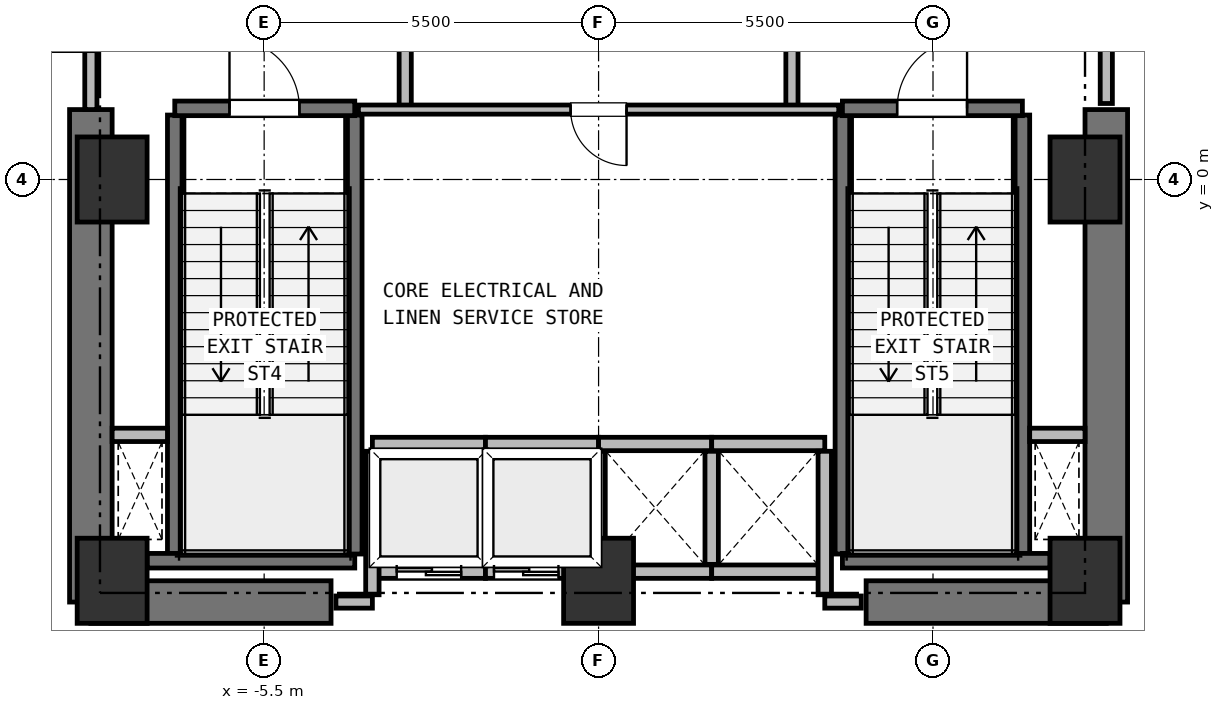
"""IFC4 building model, lengths in metres.
Left out: names, types, materials, properties, quantities, classifications, styles, units other than length and angle.
Written with IfcOpenShell. Run it as: python <this file> out.ifc"""

import sys

from ifc_helpers import new_model, si_unit, direction, frame, frame_2d, origin, origin_2d, place, context, subcontext, project, spatial, rectangle, extrude, element, fill, save


model = new_model("IFC4")
c1 = context("Model", 3, precision=1e-05, world=origin(), true_north=direction((0.0, 1.0)))
c2 = subcontext(c1, "Body", "Model", "MODEL_VIEW")
j1 = project(units=[si_unit("LENGTHUNIT", "METRE"), si_unit("PLANEANGLEUNIT", "RADIAN")], contexts=[c1])
p1 = place(None, origin())
s1 = spatial("IfcSite", under=j1, at=p1, CompositionType="ELEMENT")
p2 = place(p1, origin())
s2 = spatial("IfcBuilding", under=s1, at=p2, CompositionType="ELEMENT")
p3 = place(p2, frame((0.0, 0.0, 6.0)))
s3 = spatial("IfcBuildingStorey", under=s2, at=p3, CompositionType="ELEMENT", Elevation=6.0)
for number, where, z_axis, x_axis in (
    (1, (-8.0, -6.6, 0.0), (0.0, 0.0, 1.0), (1.0, 0.0, 0.0)),
    (2, (0.0, -6.6, 0.0), (0.0, 0.0, 1.0), (1.0, 0.0, 0.0)),
    (3, (8.0, -6.6, 0.0), (0.0, 0.0, 1.0), (1.0, 0.0, 0.0)),
    (4, (8.0, 0.0, 0.0), (0.0, 0.0, 1.0), (1.0, 0.0, 0.0)),
    (5, (-8.0, 0.0, 0.0), (0.0, 0.0, 1.0), (1.0, 0.0, 0.0)),
):
    element("IfcColumn", number, at=place(p3, frame(where, z_axis=z_axis, x_axis=x_axis)), inside=s3, PredefinedType="COLUMN", context=c2, shape_type="SweptSolid", body=[
        extrude(rectangle(XDim=1.15, YDim=1.4, at=origin_2d()), origin(), (0.0, 0.0, 1.0), 5.0),
    ])
for number, where, z_axis, x_axis in (
    (6, (-8.35, -6.95, 0.0), (0.0, 0.0, 1.0), (1.0, 0.0, 0.0)),
    (7, (4.4, -6.95, 0.0), (0.0, 0.0, 1.0), (1.0, 0.0, 0.0)),
):
    element("IfcWall", number, at=place(p3, frame(where, z_axis=z_axis, x_axis=x_axis)), inside=s3, PredefinedType="SHEAR", context=c2, shape_type="SweptSolid", body=[
        extrude(rectangle(XDim=3.95, YDim=0.7, at=frame_2d((1.975, 0.0))), origin(), (0.0, 0.0, 1.0), 4.72),
    ])
for number, where, z_axis, x_axis in (
    (8, (-8.35, -6.95, 0.0), (0.0, 0.0, 1.0), (0.0, 1.0, 0.0)),
    (9, (8.35, -6.95, 0.0), (0.0, 0.0, 1.0), (0.0, 1.0, 0.0)),
):
    element("IfcWall", number, at=place(p3, frame(where, z_axis=z_axis, x_axis=x_axis)), inside=s3, PredefinedType="SHEAR", context=c2, shape_type="SweptSolid", body=[
        extrude(rectangle(XDim=8.1, YDim=0.7, at=frame_2d((4.05, 0.0))), origin(), (0.0, 0.0, 1.0), 4.72),
    ])
p4 = place(p3, frame((-6.97, -6.16, 0.0), z_axis=(0.0, 0.0, 1.0), x_axis=(0.0, 1.0, 0.0)))
e10 = element("IfcWall", 10, at=p4, inside=s3, PredefinedType="SHEAR", context=c2, shape_type="SweptSolid", body=[
    extrude(rectangle(XDim=7.22, YDim=0.24, at=frame_2d((3.61, 0.0))), origin(), (0.0, 0.0, 1.0), 4.72),
])
p5 = place(p3, frame((-7.425, -6.27, 0.0), z_axis=(0.0, 0.0, 1.0), x_axis=(1.0, 0.0, 0.0)))
e11 = element("IfcWall", 11, at=p5, inside=s3, PredefinedType="SHEAR", context=c2, shape_type="SweptSolid", body=[
    extrude(rectangle(XDim=3.415, YDim=0.24, at=frame_2d((1.708, 0.0))), origin(), (0.0, 0.0, 1.0), 4.72),
])
p6 = place(p3, frame((-4.01, -6.16, 0.0), z_axis=(0.0, 0.0, 1.0), x_axis=(0.0, 1.0, 0.0)))
e12 = element("IfcWall", 12, at=p6, inside=s3, PredefinedType="SHEAR", context=c2, shape_type="SweptSolid", body=[
    extrude(rectangle(XDim=7.22, YDim=0.24, at=frame_2d((3.61, 0.0))), origin(), (0.0, 0.0, 1.0), 4.72),
])
p7 = place(p3, frame((-6.97, 1.17, 0.0), z_axis=(0.0, 0.0, 1.0), x_axis=(1.0, 0.0, 0.0)))
e13 = element("IfcWall", 13, at=p7, inside=s3, PredefinedType="SHEAR", context=c2, shape_type="SweptSolid", body=[
    extrude(rectangle(XDim=2.96, YDim=0.24, at=frame_2d((1.48, 0.0))), origin(), (0.0, 0.0, 1.0), 4.72),
])
p8 = place(p7, frame((0.9, 0.0, 0.0)))
e14 = element("IfcOpeningElement", 14, at=p8, cuts=e13, PredefinedType="OPENING", context=c2, shape_type="SweptSolid", body=[
    extrude(rectangle(XDim=1.15, YDim=2.15, at=frame_2d((0.575, 1.075))), frame((0.0, 0.13, 0.0), z_axis=(0.0, -1.0, 0.0), x_axis=(1.0, 0.0, 0.0)), (0.0, 0.0, 1.0), 0.26),
])
for number, where, z_axis, x_axis in (
    (15, (4.01, -6.16, 0.0), (0.0, 0.0, 1.0), (0.0, 1.0, 0.0)),
    (16, (6.97, -6.16, 0.0), (0.0, 0.0, 1.0), (0.0, 1.0, 0.0)),
):
    element("IfcWall", number, at=place(p3, frame(where, z_axis=z_axis, x_axis=x_axis)), inside=s3, PredefinedType="SHEAR", context=c2, shape_type="SweptSolid", body=[
        extrude(rectangle(XDim=7.22, YDim=0.24, at=frame_2d((3.61, 0.0))), origin(), (0.0, 0.0, 1.0), 4.72),
    ])
p9 = place(p3, frame((4.01, -6.27, 0.0), z_axis=(0.0, 0.0, 1.0), x_axis=(1.0, 0.0, 0.0)))
e17 = element("IfcWall", 17, at=p9, inside=s3, PredefinedType="SHEAR", context=c2, shape_type="SweptSolid", body=[
    extrude(rectangle(XDim=3.415, YDim=0.24, at=frame_2d((1.708, 0.0))), origin(), (0.0, 0.0, 1.0), 4.72),
])
p10 = place(p3, frame((4.01, 1.17, 0.0), z_axis=(0.0, 0.0, 1.0), x_axis=(1.0, 0.0, 0.0)))
e18 = element("IfcWall", 18, at=p10, inside=s3, PredefinedType="SHEAR", context=c2, shape_type="SweptSolid", body=[
    extrude(rectangle(XDim=2.96, YDim=0.24, at=frame_2d((1.48, 0.0))), origin(), (0.0, 0.0, 1.0), 4.72),
])
p11 = place(p10, frame((0.9, 0.0, 0.0)))
e19 = element("IfcOpeningElement", 19, at=p11, cuts=e18, PredefinedType="OPENING", context=c2, shape_type="SweptSolid", body=[
    extrude(rectangle(XDim=1.15, YDim=2.15, at=frame_2d((0.575, 1.075))), frame((0.0, 0.13, 0.0), z_axis=(0.0, -1.0, 0.0), x_axis=(1.0, 0.0, 0.0)), (0.0, 0.0, 1.0), 0.26),
])
for number, where, z_axis, x_axis in (
    (20, (-8.0, -4.2, 0.0), (0.0, 0.0, 1.0), (1.0, 0.0, 0.0)),
    (21, (7.09, -4.2, 0.0), (0.0, 0.0, 1.0), (1.0, 0.0, 0.0)),
):
    element("IfcWall", number, at=place(p3, frame(where, z_axis=z_axis, x_axis=x_axis)), inside=s3, PredefinedType="PARTITIONING", context=c2, shape_type="SweptSolid", body=[
        extrude(rectangle(XDim=0.91, YDim=0.22, at=frame_2d((0.455, 0.0))), origin(), (0.0, 0.0, 1.0), 4.72),
    ])
p12 = place(p3, frame((-3.72, -6.45, 0.0), z_axis=(0.0, 0.0, 1.0), x_axis=(1.0, 0.0, 0.0)))
e22 = element("IfcWall", 22, at=p12, inside=s3, PredefinedType="PARTITIONING", context=c2, shape_type="SweptSolid", body=[
    extrude(rectangle(XDim=1.86, YDim=0.22, at=frame_2d((0.93, 0.0))), origin(), (0.0, 0.0, 1.0), 4.3),
])
p13 = place(p12, frame((0.4, 0.0, 0.0)))
e23 = element("IfcOpeningElement", 23, at=p13, cuts=e22, PredefinedType="OPENING", context=c2, shape_type="SweptSolid", body=[
    extrude(rectangle(XDim=1.06, YDim=2.15, at=frame_2d((0.53, 1.075))), frame((0.0, 0.12, 0.0), z_axis=(0.0, -1.0, 0.0), x_axis=(1.0, 0.0, 0.0)), (0.0, 0.0, 1.0), 0.24),
])
p14 = place(p3, frame((-3.72, -4.35, 0.0), z_axis=(0.0, 0.0, 1.0), x_axis=(1.0, 0.0, 0.0)))
e24 = element("IfcWall", 24, at=p14, inside=s3, PredefinedType="PARTITIONING", context=c2, shape_type="SweptSolid", body=[
    extrude(rectangle(XDim=1.86, YDim=0.22, at=frame_2d((0.93, 0.0))), origin(), (0.0, 0.0, 1.0), 4.72),
])
p15 = place(p3, frame((-3.72, -6.83, 0.0), z_axis=(0.0, 0.0, 1.0), x_axis=(0.0, 1.0, 0.0)))
e25 = element("IfcWall", 25, at=p15, inside=s3, PredefinedType="PARTITIONING", context=c2, shape_type="SweptSolid", body=[
    extrude(rectangle(XDim=2.36, YDim=0.22, at=frame_2d((1.18, 0.0))), origin(), (0.0, 0.0, 1.0), 4.72),
])
p16 = place(p3, frame((-1.86, -6.33, 0.0), z_axis=(0.0, 0.0, 1.0), x_axis=(0.0, 1.0, 0.0)))
e26 = element("IfcWall", 26, at=p16, inside=s3, PredefinedType="PARTITIONING", context=c2, shape_type="SweptSolid", body=[
    extrude(rectangle(XDim=1.86, YDim=0.22, at=frame_2d((0.93, 0.0))), origin(), (0.0, 0.0, 1.0), 4.72),
])
p17 = place(p3, frame((-1.86, -6.45, 0.0), z_axis=(0.0, 0.0, 1.0), x_axis=(1.0, 0.0, 0.0)))
e27 = element("IfcWall", 27, at=p17, inside=s3, PredefinedType="PARTITIONING", context=c2, shape_type="SweptSolid", body=[
    extrude(rectangle(XDim=1.86, YDim=0.22, at=frame_2d((0.93, 0.0))), origin(), (0.0, 0.0, 1.0), 4.3),
])
p18 = place(p17, frame((0.14, 0.0, 0.0)))
e28 = element("IfcOpeningElement", 28, at=p18, cuts=e27, PredefinedType="OPENING", context=c2, shape_type="SweptSolid", body=[
    extrude(rectangle(XDim=1.06, YDim=2.15, at=frame_2d((0.53, 1.075))), frame((0.0, 0.12, 0.0), z_axis=(0.0, -1.0, 0.0), x_axis=(1.0, 0.0, 0.0)), (0.0, 0.0, 1.0), 0.24),
])
for number, where, z_axis, x_axis in (
    (29, (-1.86, -4.35, 0.0), (0.0, 0.0, 1.0), (1.0, 0.0, 0.0)),
    (30, (0.0, -6.33, 0.0), (0.0, 0.0, 1.0), (0.0, 1.0, 0.0)),
):
    element("IfcWall", number, at=place(p3, frame(where, z_axis=z_axis, x_axis=x_axis)), inside=s3, PredefinedType="PARTITIONING", context=c2, shape_type="SweptSolid", body=[
        extrude(rectangle(XDim=1.86, YDim=0.22, at=frame_2d((0.93, 0.0))), origin(), (0.0, 0.0, 1.0), 4.72),
    ])
p19 = place(p3, frame((0.0, -6.45, 0.0), z_axis=(0.0, 0.0, 1.0), x_axis=(1.0, 0.0, 0.0)))
e31 = element("IfcWall", 31, at=p19, inside=s3, PredefinedType="PARTITIONING", context=c2, shape_type="SweptSolid", body=[
    extrude(rectangle(XDim=1.86, YDim=0.22, at=frame_2d((0.93, 0.0))), origin(), (0.0, 0.0, 1.0), 4.3),
])
for number, where, z_axis, x_axis in (
    (32, (0.0, -4.35, 0.0), (0.0, 0.0, 1.0), (1.0, 0.0, 0.0)),
    (33, (1.86, -6.33, 0.0), (0.0, 0.0, 1.0), (0.0, 1.0, 0.0)),
):
    element("IfcWall", number, at=place(p3, frame(where, z_axis=z_axis, x_axis=x_axis)), inside=s3, PredefinedType="PARTITIONING", context=c2, shape_type="SweptSolid", body=[
        extrude(rectangle(XDim=1.86, YDim=0.22, at=frame_2d((0.93, 0.0))), origin(), (0.0, 0.0, 1.0), 4.72),
    ])
p20 = place(p3, frame((1.86, -6.45, 0.0), z_axis=(0.0, 0.0, 1.0), x_axis=(1.0, 0.0, 0.0)))
e34 = element("IfcWall", 34, at=p20, inside=s3, PredefinedType="PARTITIONING", context=c2, shape_type="SweptSolid", body=[
    extrude(rectangle(XDim=1.86, YDim=0.22, at=frame_2d((0.93, 0.0))), origin(), (0.0, 0.0, 1.0), 4.3),
])
p21 = place(p3, frame((1.86, -4.35, 0.0), z_axis=(0.0, 0.0, 1.0), x_axis=(1.0, 0.0, 0.0)))
e35 = element("IfcWall", 35, at=p21, inside=s3, PredefinedType="PARTITIONING", context=c2, shape_type="SweptSolid", body=[
    extrude(rectangle(XDim=1.86, YDim=0.22, at=frame_2d((0.93, 0.0))), origin(), (0.0, 0.0, 1.0), 4.72),
])
p22 = place(p3, frame((3.72, -6.83, 0.0), z_axis=(0.0, 0.0, 1.0), x_axis=(0.0, 1.0, 0.0)))
e36 = element("IfcWall", 36, at=p22, inside=s3, PredefinedType="PARTITIONING", context=c2, shape_type="SweptSolid", body=[
    extrude(rectangle(XDim=2.36, YDim=0.22, at=frame_2d((1.18, 0.0))), origin(), (0.0, 0.0, 1.0), 4.72),
])
p23 = place(p3, frame((-3.18, 1.15, 0.0), z_axis=(0.0, 0.0, 1.0), x_axis=(0.0, 1.0, 0.0)))
e37 = element("IfcWall", 37, at=p23, inside=s3, PredefinedType="PARTITIONING", context=c2, shape_type="SweptSolid", body=[
    extrude(rectangle(XDim=3.3, YDim=0.2, at=frame_2d((1.65, 0.0))), origin(), (0.0, 0.0, 1.0), 4.72),
])
p24 = place(p23, frame((1.08, 0.0, 0.0)))
e38 = element("IfcOpeningElement", 38, at=p24, cuts=e37, PredefinedType="OPENING", context=c2, shape_type="SweptSolid", body=[
    extrude(rectangle(XDim=1.15, YDim=2.15, at=frame_2d((0.575, 1.075))), frame((0.0, 0.11, 0.0), z_axis=(0.0, -1.0, 0.0), x_axis=(1.0, 0.0, 0.0)), (0.0, 0.0, 1.0), 0.22),
])
p25 = place(p3, frame((3.18, 1.15, 0.0), z_axis=(0.0, 0.0, 1.0), x_axis=(0.0, 1.0, 0.0)))
e39 = element("IfcWall", 39, at=p25, inside=s3, PredefinedType="PARTITIONING", context=c2, shape_type="SweptSolid", body=[
    extrude(rectangle(XDim=3.3, YDim=0.2, at=frame_2d((1.65, 0.0))), origin(), (0.0, 0.0, 1.0), 4.72),
])
p26 = place(p25, frame((1.08, 0.0, 0.0)))
e40 = element("IfcOpeningElement", 40, at=p26, cuts=e39, PredefinedType="OPENING", context=c2, shape_type="SweptSolid", body=[
    extrude(rectangle(XDim=1.15, YDim=2.15, at=frame_2d((0.575, 1.075))), frame((0.0, 0.11, 0.0), z_axis=(0.0, -1.0, 0.0), x_axis=(1.0, 0.0, 0.0)), (0.0, 0.0, 1.0), 0.22),
])
p27 = place(p3, frame((-8.35, 1.15, 0.0), z_axis=(0.0, 0.0, 1.0), x_axis=(0.0, 1.0, 0.0)))
e41 = element("IfcWall", 41, at=p27, inside=s3, PredefinedType="PARTITIONING", context=c2, shape_type="SweptSolid", body=[
    extrude(rectangle(XDim=5.4, YDim=0.2, at=frame_2d((2.7, 0.0))), origin(), (0.0, 0.0, 1.0), 4.72),
])
p28 = place(p27, frame((0.95, 0.0, 0.0)))
e42 = element("IfcOpeningElement", 42, at=p28, cuts=e41, PredefinedType="OPENING", context=c2, shape_type="SweptSolid", body=[
    extrude(rectangle(XDim=1.15, YDim=2.15, at=frame_2d((0.575, 1.075))), frame((0.0, 0.11, 0.0), z_axis=(0.0, -1.0, 0.0), x_axis=(1.0, 0.0, 0.0)), (0.0, 0.0, 1.0), 0.22),
])
p29 = place(p3, frame((8.35, 1.25, 0.0), z_axis=(0.0, 0.0, 1.0), x_axis=(0.0, 1.0, 0.0)))
e43 = element("IfcWall", 43, at=p29, inside=s3, PredefinedType="PARTITIONING", context=c2, shape_type="SweptSolid", body=[
    extrude(rectangle(XDim=5.3, YDim=0.2, at=frame_2d((2.65, 0.0))), origin(), (0.0, 0.0, 1.0), 4.72),
])
p30 = place(p29, frame((0.95, 0.0, 0.0)))
e44 = element("IfcOpeningElement", 44, at=p30, cuts=e43, PredefinedType="OPENING", context=c2, shape_type="SweptSolid", body=[
    extrude(rectangle(XDim=1.15, YDim=2.15, at=frame_2d((0.575, 1.075))), frame((0.0, 0.11, 0.0), z_axis=(0.0, -1.0, 0.0), x_axis=(1.0, 0.0, 0.0)), (0.0, 0.0, 1.0), 0.22),
])
p31 = place(p3, frame((3.95, 1.15, 0.0), z_axis=(0.0, 0.0, 1.0), x_axis=(-1.0, 0.0, 0.0)))
e45 = element("IfcWall", 45, at=p31, inside=s3, PredefinedType="PARTITIONING", context=c2, shape_type="SweptSolid", body=[
    extrude(rectangle(XDim=7.9, YDim=0.15, at=frame_2d((3.95, 0.0))), origin(), (0.0, 0.0, 1.0), 4.72),
])
p32 = place(p31, frame((3.49, 0.0, 0.0)))
e46 = element("IfcOpeningElement", 46, at=p32, cuts=e45, PredefinedType="OPENING", context=c2, shape_type="SweptSolid", body=[
    extrude(rectangle(XDim=0.92, YDim=2.05, at=frame_2d((0.46, 1.025))), frame((0.0, 0.085, 0.0), z_axis=(0.0, -1.0, 0.0), x_axis=(1.0, 0.0, 0.0)), (0.0, 0.0, 1.0), 0.17),
])
for number, where, z_axis, x_axis in (
    (47, (-4.32, -6.95, 0.0), (0.0, 0.0, 1.0), (1.0, 0.0, 0.0)),
    (48, (3.72, -6.95, 0.0), (0.0, 0.0, 1.0), (1.0, 0.0, 0.0)),
):
    element("IfcWall", number, at=place(p3, frame(where, z_axis=z_axis, x_axis=x_axis)), inside=s3, PredefinedType="PARTITIONING", context=c2, shape_type="SweptSolid", body=[
        extrude(rectangle(XDim=0.6, YDim=0.2, at=frame_2d((0.3, 0.0))), origin(), (0.0, 0.0, 1.0), 4.72),
    ])
p33 = place(p8, origin())
e49 = element("IfcDoor", 49, at=p33, inside=s3, OperationType="SINGLE_SWING_LEFT", PredefinedType="DOOR", context=c2, shape_type="SweptSolid", body=[
    extrude(rectangle(XDim=1.15, YDim=2.15, at=frame_2d((0.575, 1.075))), frame((0.0, 0.025, 0.0), z_axis=(0.0, -1.0, 0.0), x_axis=(1.0, 0.0, 0.0)), (0.0, 0.0, 1.0), 0.05),
])
fill(e14, e49)
p34 = place(p11, origin())
e50 = element("IfcDoor", 50, at=p34, inside=s3, OperationType="SINGLE_SWING_RIGHT", PredefinedType="DOOR", context=c2, shape_type="SweptSolid", body=[
    extrude(rectangle(XDim=1.15, YDim=2.15, at=frame_2d((0.575, 1.075))), frame((0.0, 0.025, 0.0), z_axis=(0.0, -1.0, 0.0), x_axis=(1.0, 0.0, 0.0)), (0.0, 0.0, 1.0), 0.05),
])
fill(e19, e50)
p35 = place(p13, origin())
e51 = element("IfcDoor", 51, at=p35, inside=s3, OperationType="DOUBLE_DOOR_SLIDING", PredefinedType="DOOR", context=c2, shape_type="SweptSolid", body=[
    extrude(rectangle(XDim=1.06, YDim=2.15, at=frame_2d((0.53, 1.075))), frame((0.0, 0.025, 0.0), z_axis=(0.0, -1.0, 0.0), x_axis=(1.0, 0.0, 0.0)), (0.0, 0.0, 1.0), 0.05),
])
fill(e23, e51)
p36 = place(p18, origin())
e52 = element("IfcDoor", 52, at=p36, inside=s3, OperationType="DOUBLE_DOOR_SLIDING", PredefinedType="DOOR", context=c2, shape_type="SweptSolid", body=[
    extrude(rectangle(XDim=1.06, YDim=2.15, at=frame_2d((0.53, 1.075))), frame((0.0, 0.025, 0.0), z_axis=(0.0, -1.0, 0.0), x_axis=(1.0, 0.0, 0.0)), (0.0, 0.0, 1.0), 0.05),
])
fill(e28, e52)
p37 = place(p28, origin())
e53 = element("IfcDoor", 53, at=p37, inside=s3, OperationType="SINGLE_SWING_LEFT", PredefinedType="DOOR", context=c2, shape_type="SweptSolid", body=[
    extrude(rectangle(XDim=1.15, YDim=2.15, at=frame_2d((0.575, 1.075))), frame((0.0, 0.025, 0.0), z_axis=(0.0, -1.0, 0.0), x_axis=(1.0, 0.0, 0.0)), (0.0, 0.0, 1.0), 0.05),
])
fill(e42, e53)
p38 = place(p32, origin())
e54 = element("IfcDoor", 54, at=p38, inside=s3, OperationType="SINGLE_SWING_LEFT", PredefinedType="DOOR", context=c2, shape_type="SweptSolid", body=[
    extrude(rectangle(XDim=0.92, YDim=2.05, at=frame_2d((0.46, 1.025))), frame((0.0, 0.025, 0.0), z_axis=(0.0, -1.0, 0.0), x_axis=(1.0, 0.0, 0.0)), (0.0, 0.0, 1.0), 0.05),
])
fill(e46, e54)
save(model, sys.argv[1])
